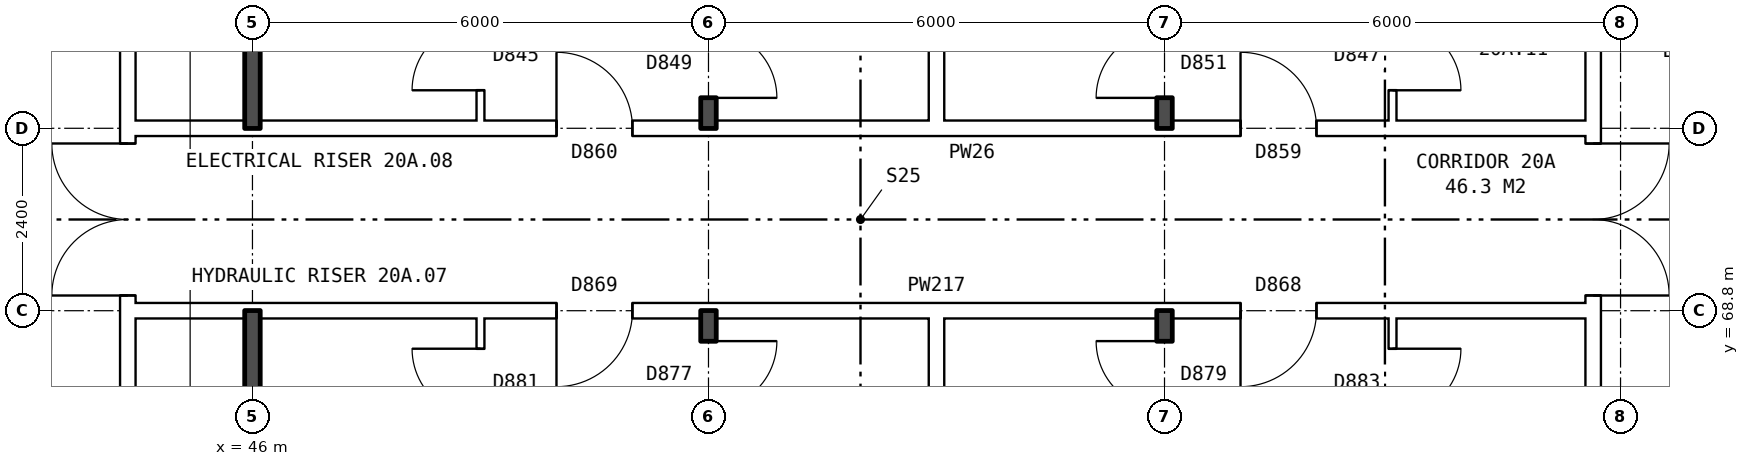
"""IFC4 building model, lengths in metres.
Left out: names, types, materials, properties, quantities, classifications, styles, units other than length and angle.
Written with IfcOpenShell. Run it as: python <this file> out.ifc"""

import sys

from ifc_helpers import new_model, si_unit, direction, frame, frame_2d, origin, place, context, subcontext, project, spatial, rectangle, extrude, element, fill, save


model = new_model("IFC4")
c1 = context("Model", 3, precision=1e-05, world=origin(), true_north=direction((0.0, 1.0)))
c2 = subcontext(c1, "Body", "Model", "MODEL_VIEW")
j1 = project(units=[si_unit("LENGTHUNIT", "METRE"), si_unit("PLANEANGLEUNIT", "RADIAN")], contexts=[c1])
p1 = place(None, origin())
s1 = spatial("IfcSite", under=j1, at=p1, CompositionType="ELEMENT")
p2 = place(p1, origin())
s2 = spatial("IfcBuilding", under=s1, at=p2, CompositionType="ELEMENT")
p3 = place(p2, frame((0.0, 0.0, 74.7)))
s3 = spatial("IfcBuildingStorey", under=s2, at=p3, CompositionType="ELEMENT", Elevation=74.7)
p4 = place(p3, frame((63.64, 63.9, 0.0), z_axis=(0.0, 0.0, 1.0), x_axis=(0.0, 1.0, 0.0)))
e1 = element("IfcWall", 1, at=p4, inside=s3, PredefinedType="PARTITIONING", context=c2, shape_type="SweptSolid", body=[
    extrude(rectangle(XDim=12.2, YDim=0.2, at=frame_2d((6.1, 0.0))), origin(), (0.0, 0.0, 1.0), 2.85),
])
p5 = place(p4, frame((5.1, 0.0, 0.0)))
e2 = element("IfcOpeningElement", 2, at=p5, cuts=e1, PredefinedType="OPENING", context=c2, shape_type="SweptSolid", body=[
    extrude(rectangle(XDim=2.0, YDim=2.1, at=frame_2d((1.0, 1.05))), frame((0.0, 0.11, 0.0), z_axis=(0.0, -1.0, 0.0), x_axis=(1.0, 0.0, 0.0)), (0.0, 0.0, 1.0), 0.22),
])
p6 = place(p3, frame((44.36, 63.9, 0.0), z_axis=(0.0, 0.0, 1.0), x_axis=(0.0, 1.0, 0.0)))
e3 = element("IfcWall", 3, at=p6, inside=s3, PredefinedType="PARTITIONING", context=c2, shape_type="SweptSolid", body=[
    extrude(rectangle(XDim=12.2, YDim=0.2, at=frame_2d((6.1, 0.0))), origin(), (0.0, 0.0, 1.0), 2.85),
])
p7 = place(p6, frame((5.1, 0.0, 0.0)))
e4 = element("IfcOpeningElement", 4, at=p7, cuts=e3, PredefinedType="OPENING", context=c2, shape_type="SweptSolid", body=[
    extrude(rectangle(XDim=2.0, YDim=2.1, at=frame_2d((1.0, 1.05))), frame((0.0, 0.11, 0.0), z_axis=(0.0, -1.0, 0.0), x_axis=(1.0, 0.0, 0.0)), (0.0, 0.0, 1.0), 0.22),
])
p8 = place(p3, frame((44.36, 68.8, 0.0), z_axis=(0.0, 0.0, 1.0), x_axis=(1.0, 0.0, 0.0)))
e5 = element("IfcWall", 5, at=p8, inside=s3, PredefinedType="PARTITIONING", context=c2, shape_type="SweptSolid", body=[
    extrude(rectangle(XDim=19.28, YDim=0.2, at=frame_2d((9.64, 0.0))), origin(), (0.0, 0.0, 1.0), 2.85),
])
p9 = place(p8, frame((14.64, 0.0, 0.0)))
e6 = element("IfcOpeningElement", 6, at=p9, cuts=e5, PredefinedType="OPENING", context=c2, shape_type="SweptSolid", body=[
    extrude(rectangle(XDim=1.0, YDim=2.1, at=frame_2d((0.5, 1.05))), frame((0.0, 0.11, 0.0), z_axis=(0.0, -1.0, 0.0), x_axis=(1.0, 0.0, 0.0)), (0.0, 0.0, 1.0), 0.22),
])
p10 = place(p8, frame((5.64, 0.0, 0.0)))
e7 = element("IfcOpeningElement", 7, at=p10, cuts=e5, PredefinedType="OPENING", context=c2, shape_type="SweptSolid", body=[
    extrude(rectangle(XDim=1.0, YDim=2.1, at=frame_2d((0.5, 1.05))), frame((0.0, 0.11, 0.0), z_axis=(0.0, -1.0, 0.0), x_axis=(1.0, 0.0, 0.0)), (0.0, 0.0, 1.0), 0.22),
])
p11 = place(p3, frame((44.36, 71.2, 0.0), z_axis=(0.0, 0.0, 1.0), x_axis=(1.0, 0.0, 0.0)))
e8 = element("IfcWall", 8, at=p11, inside=s3, PredefinedType="PARTITIONING", context=c2, shape_type="SweptSolid", body=[
    extrude(rectangle(XDim=19.28, YDim=0.2, at=frame_2d((9.64, 0.0))), origin(), (0.0, 0.0, 1.0), 2.85),
])
p12 = place(p11, frame((14.64, 0.0, 0.0)))
e9 = element("IfcOpeningElement", 9, at=p12, cuts=e8, PredefinedType="OPENING", context=c2, shape_type="SweptSolid", body=[
    extrude(rectangle(XDim=1.0, YDim=2.1, at=frame_2d((0.5, 1.05))), frame((0.0, 0.11, 0.0), z_axis=(0.0, -1.0, 0.0), x_axis=(1.0, 0.0, 0.0)), (0.0, 0.0, 1.0), 0.22),
])
p13 = place(p11, frame((5.64, 0.0, 0.0)))
e10 = element("IfcOpeningElement", 10, at=p13, cuts=e8, PredefinedType="OPENING", context=c2, shape_type="SweptSolid", body=[
    extrude(rectangle(XDim=1.0, YDim=2.1, at=frame_2d((0.5, 1.05))), frame((0.0, 0.11, 0.0), z_axis=(0.0, -1.0, 0.0), x_axis=(1.0, 0.0, 0.0)), (0.0, 0.0, 1.0), 0.22),
])
for number, where, z_axis, x_axis in (
    (11, (46.0, 63.8, 0.0), (0.0, 0.0, 1.0), (0.0, 1.0, 0.0)),
    (12, (46.0, 71.2, 0.0), (0.0, 0.0, 1.0), (0.0, 1.0, 0.0)),
):
    element("IfcWall", number, at=place(p3, frame(where, z_axis=z_axis, x_axis=x_axis)), inside=s3, PredefinedType="SOLIDWALL", context=c2, shape_type="SweptSolid", body=[
        extrude(rectangle(XDim=5.0, YDim=0.2, at=frame_2d((2.5, 0.0))), origin(), (0.0, 0.0, 1.0), 2.85),
    ])
p14 = place(p3, frame((49.0, 54.36, 0.0), z_axis=(0.0, 0.0, 1.0), x_axis=(0.0, 1.0, 0.0)))
e13 = element("IfcWall", 13, at=p14, inside=s3, PredefinedType="PARTITIONING", context=c2, shape_type="SweptSolid", body=[
    extrude(rectangle(XDim=14.34, YDim=0.1, at=frame_2d((7.17, 0.0))), origin(), (0.0, 0.0, 1.0), 2.85),
])
p15 = place(p14, frame((6.7, 0.0, 0.0)))
e14 = element("IfcOpeningElement", 14, at=p15, cuts=e13, PredefinedType="OPENING", context=c2, shape_type="SweptSolid", body=[
    extrude(rectangle(XDim=0.9, YDim=2.1, at=frame_2d((0.45, 1.05))), frame((0.0, 0.06, 0.0), z_axis=(0.0, -1.0, 0.0), x_axis=(1.0, 0.0, 0.0)), (0.0, 0.0, 1.0), 0.12),
])
p16 = place(p14, frame((13.04, 0.0, 0.0)))
e15 = element("IfcOpeningElement", 15, at=p16, cuts=e13, PredefinedType="OPENING", context=c2, shape_type="SweptSolid", body=[
    extrude(rectangle(XDim=0.9, YDim=2.1, at=frame_2d((0.45, 1.05))), frame((0.0, 0.06, 0.0), z_axis=(0.0, -1.0, 0.0), x_axis=(1.0, 0.0, 0.0)), (0.0, 0.0, 1.0), 0.12),
])
p17 = place(p3, frame((49.0, 71.3, 0.0), z_axis=(0.0, 0.0, 1.0), x_axis=(0.0, 1.0, 0.0)))
e16 = element("IfcWall", 16, at=p17, inside=s3, PredefinedType="PARTITIONING", context=c2, shape_type="SweptSolid", body=[
    extrude(rectangle(XDim=14.34, YDim=0.1, at=frame_2d((7.17, 0.0))), origin(), (0.0, 0.0, 1.0), 2.85),
])
p18 = place(p17, frame((5.74, 0.0, 0.0)))
e17 = element("IfcOpeningElement", 17, at=p18, cuts=e16, PredefinedType="OPENING", context=c2, shape_type="SweptSolid", body=[
    extrude(rectangle(XDim=0.9, YDim=2.1, at=frame_2d((0.45, 1.05))), frame((0.0, 0.06, 0.0), z_axis=(0.0, -1.0, 0.0), x_axis=(1.0, 0.0, 0.0)), (0.0, 0.0, 1.0), 0.12),
])
p19 = place(p17, frame((0.4, 0.0, 0.0)))
e18 = element("IfcOpeningElement", 18, at=p19, cuts=e16, PredefinedType="OPENING", context=c2, shape_type="SweptSolid", body=[
    extrude(rectangle(XDim=0.9, YDim=2.1, at=frame_2d((0.45, 1.05))), frame((0.0, 0.06, 0.0), z_axis=(0.0, -1.0, 0.0), x_axis=(1.0, 0.0, 0.0)), (0.0, 0.0, 1.0), 0.12),
])
p20 = place(p3, frame((52.0, 54.36, 0.0), z_axis=(0.0, 0.0, 1.0), x_axis=(0.0, 1.0, 0.0)))
e19 = element("IfcWall", 19, at=p20, inside=s3, PredefinedType="SOLIDWALL", context=c2, shape_type="SweptSolid", body=[
    extrude(rectangle(XDim=14.44, YDim=0.2, at=frame_2d((7.22, 0.0))), origin(), (0.0, 0.0, 1.0), 2.85),
])
p21 = place(p20, frame((6.7, 0.0, 0.0)))
e20 = element("IfcOpeningElement", 20, at=p21, cuts=e19, PredefinedType="OPENING", context=c2, shape_type="SweptSolid", body=[
    extrude(rectangle(XDim=0.9, YDim=2.1, at=frame_2d((0.45, 1.05))), frame((0.0, 0.11, 0.0), z_axis=(0.0, -1.0, 0.0), x_axis=(1.0, 0.0, 0.0)), (0.0, 0.0, 1.0), 0.22),
])
p22 = place(p20, frame((13.14, 0.0, 0.0)))
e21 = element("IfcOpeningElement", 21, at=p22, cuts=e19, PredefinedType="OPENING", context=c2, shape_type="SweptSolid", body=[
    extrude(rectangle(XDim=0.9, YDim=2.1, at=frame_2d((0.45, 1.05))), frame((0.0, 0.11, 0.0), z_axis=(0.0, -1.0, 0.0), x_axis=(1.0, 0.0, 0.0)), (0.0, 0.0, 1.0), 0.22),
])
p23 = place(p3, frame((52.0, 71.2, 0.0), z_axis=(0.0, 0.0, 1.0), x_axis=(0.0, 1.0, 0.0)))
e22 = element("IfcWall", 22, at=p23, inside=s3, PredefinedType="SOLIDWALL", context=c2, shape_type="SweptSolid", body=[
    extrude(rectangle(XDim=14.44, YDim=0.2, at=frame_2d((7.22, 0.0))), origin(), (0.0, 0.0, 1.0), 2.85),
])
p24 = place(p23, frame((5.84, 0.0, 0.0)))
e23 = element("IfcOpeningElement", 23, at=p24, cuts=e22, PredefinedType="OPENING", context=c2, shape_type="SweptSolid", body=[
    extrude(rectangle(XDim=0.9, YDim=2.1, at=frame_2d((0.45, 1.05))), frame((0.0, 0.11, 0.0), z_axis=(0.0, -1.0, 0.0), x_axis=(1.0, 0.0, 0.0)), (0.0, 0.0, 1.0), 0.22),
])
p25 = place(p23, frame((0.4, 0.0, 0.0)))
e24 = element("IfcOpeningElement", 24, at=p25, cuts=e22, PredefinedType="OPENING", context=c2, shape_type="SweptSolid", body=[
    extrude(rectangle(XDim=0.9, YDim=2.1, at=frame_2d((0.45, 1.05))), frame((0.0, 0.11, 0.0), z_axis=(0.0, -1.0, 0.0), x_axis=(1.0, 0.0, 0.0)), (0.0, 0.0, 1.0), 0.22),
])
for number, where, z_axis, x_axis in (
    (25, (55.0, 54.36, 0.0), (0.0, 0.0, 1.0), (0.0, 1.0, 0.0)),
    (26, (55.0, 71.3, 0.0), (0.0, 0.0, 1.0), (0.0, 1.0, 0.0)),
):
    element("IfcWall", number, at=place(p3, frame(where, z_axis=z_axis, x_axis=x_axis)), inside=s3, PredefinedType="PARTITIONING", context=c2, shape_type="SweptSolid", body=[
        extrude(rectangle(XDim=14.34, YDim=0.2, at=frame_2d((7.17, 0.0))), origin(), (0.0, 0.0, 1.0), 2.85),
    ])
p26 = place(p3, frame((58.0, 54.36, 0.0), z_axis=(0.0, 0.0, 1.0), x_axis=(0.0, 1.0, 0.0)))
e27 = element("IfcWall", 27, at=p26, inside=s3, PredefinedType="SOLIDWALL", context=c2, shape_type="SweptSolid", body=[
    extrude(rectangle(XDim=14.44, YDim=0.2, at=frame_2d((7.22, 0.0))), origin(), (0.0, 0.0, 1.0), 2.85),
])
p27 = place(p26, frame((7.7, 0.0, 0.0)))
e28 = element("IfcOpeningElement", 28, at=p27, cuts=e27, PredefinedType="OPENING", context=c2, shape_type="SweptSolid", body=[
    extrude(rectangle(XDim=0.9, YDim=2.1, at=frame_2d((0.45, 1.05))), frame((0.0, 0.11, 0.0), z_axis=(0.0, -1.0, 0.0), x_axis=(1.0, 0.0, 0.0)), (0.0, 0.0, 1.0), 0.22),
])
p28 = place(p26, frame((13.14, 0.0, 0.0)))
e29 = element("IfcOpeningElement", 29, at=p28, cuts=e27, PredefinedType="OPENING", context=c2, shape_type="SweptSolid", body=[
    extrude(rectangle(XDim=0.9, YDim=2.1, at=frame_2d((0.45, 1.05))), frame((0.0, 0.11, 0.0), z_axis=(0.0, -1.0, 0.0), x_axis=(1.0, 0.0, 0.0)), (0.0, 0.0, 1.0), 0.22),
])
p29 = place(p3, frame((58.0, 71.2, 0.0), z_axis=(0.0, 0.0, 1.0), x_axis=(0.0, 1.0, 0.0)))
e30 = element("IfcWall", 30, at=p29, inside=s3, PredefinedType="SOLIDWALL", context=c2, shape_type="SweptSolid", body=[
    extrude(rectangle(XDim=14.44, YDim=0.2, at=frame_2d((7.22, 0.0))), origin(), (0.0, 0.0, 1.0), 2.85),
])
p30 = place(p29, frame((8.04, 0.0, 0.0)))
e31 = element("IfcOpeningElement", 31, at=p30, cuts=e30, PredefinedType="OPENING", context=c2, shape_type="SweptSolid", body=[
    extrude(rectangle(XDim=0.9, YDim=2.1, at=frame_2d((0.45, 1.05))), frame((0.0, 0.11, 0.0), z_axis=(0.0, -1.0, 0.0), x_axis=(1.0, 0.0, 0.0)), (0.0, 0.0, 1.0), 0.22),
])
p31 = place(p29, frame((0.4, 0.0, 0.0)))
e32 = element("IfcOpeningElement", 32, at=p31, cuts=e30, PredefinedType="OPENING", context=c2, shape_type="SweptSolid", body=[
    extrude(rectangle(XDim=0.9, YDim=2.1, at=frame_2d((0.45, 1.05))), frame((0.0, 0.11, 0.0), z_axis=(0.0, -1.0, 0.0), x_axis=(1.0, 0.0, 0.0)), (0.0, 0.0, 1.0), 0.22),
])
p32 = place(p3, frame((61.0, 54.36, 0.0), z_axis=(0.0, 0.0, 1.0), x_axis=(0.0, 1.0, 0.0)))
e33 = element("IfcWall", 33, at=p32, inside=s3, PredefinedType="PARTITIONING", context=c2, shape_type="SweptSolid", body=[
    extrude(rectangle(XDim=14.34, YDim=0.1, at=frame_2d((7.17, 0.0))), origin(), (0.0, 0.0, 1.0), 2.85),
])
p33 = place(p32, frame((7.7, 0.0, 0.0)))
e34 = element("IfcOpeningElement", 34, at=p33, cuts=e33, PredefinedType="OPENING", context=c2, shape_type="SweptSolid", body=[
    extrude(rectangle(XDim=0.9, YDim=2.1, at=frame_2d((0.45, 1.05))), frame((0.0, 0.06, 0.0), z_axis=(0.0, -1.0, 0.0), x_axis=(1.0, 0.0, 0.0)), (0.0, 0.0, 1.0), 0.12),
])
p34 = place(p32, frame((13.04, 0.0, 0.0)))
e35 = element("IfcOpeningElement", 35, at=p34, cuts=e33, PredefinedType="OPENING", context=c2, shape_type="SweptSolid", body=[
    extrude(rectangle(XDim=0.9, YDim=2.1, at=frame_2d((0.45, 1.05))), frame((0.0, 0.06, 0.0), z_axis=(0.0, -1.0, 0.0), x_axis=(1.0, 0.0, 0.0)), (0.0, 0.0, 1.0), 0.12),
])
p35 = place(p3, frame((61.0, 71.3, 0.0), z_axis=(0.0, 0.0, 1.0), x_axis=(0.0, 1.0, 0.0)))
e36 = element("IfcWall", 36, at=p35, inside=s3, PredefinedType="PARTITIONING", context=c2, shape_type="SweptSolid", body=[
    extrude(rectangle(XDim=14.34, YDim=0.1, at=frame_2d((7.17, 0.0))), origin(), (0.0, 0.0, 1.0), 2.85),
])
p36 = place(p35, frame((7.94, 0.0, 0.0)))
e37 = element("IfcOpeningElement", 37, at=p36, cuts=e36, PredefinedType="OPENING", context=c2, shape_type="SweptSolid", body=[
    extrude(rectangle(XDim=0.9, YDim=2.1, at=frame_2d((0.45, 1.05))), frame((0.0, 0.06, 0.0), z_axis=(0.0, -1.0, 0.0), x_axis=(1.0, 0.0, 0.0)), (0.0, 0.0, 1.0), 0.12),
])
p37 = place(p35, frame((0.4, 0.0, 0.0)))
e38 = element("IfcOpeningElement", 38, at=p37, cuts=e36, PredefinedType="OPENING", context=c2, shape_type="SweptSolid", body=[
    extrude(rectangle(XDim=0.9, YDim=2.1, at=frame_2d((0.45, 1.05))), frame((0.0, 0.06, 0.0), z_axis=(0.0, -1.0, 0.0), x_axis=(1.0, 0.0, 0.0)), (0.0, 0.0, 1.0), 0.12),
])
p38 = place(p5, frame((2.0, 0.0, 0.0), z_axis=(0.0, 0.0, 1.0), x_axis=(-1.0, 0.0, 0.0)))
e39 = element("IfcDoor", 39, at=p38, inside=s3, OperationType="DOUBLE_DOOR_SINGLE_SWING", PredefinedType="DOOR", context=c2, shape_type="SweptSolid", body=[
    extrude(rectangle(XDim=2.0, YDim=2.1, at=frame_2d((1.0, 1.05))), frame((0.0, 0.025, 0.0), z_axis=(0.0, -1.0, 0.0), x_axis=(1.0, 0.0, 0.0)), (0.0, 0.0, 1.0), 0.05),
])
fill(e2, e39)
p39 = place(p7, origin())
e40 = element("IfcDoor", 40, at=p39, inside=s3, OperationType="DOUBLE_DOOR_SINGLE_SWING", PredefinedType="DOOR", context=c2, shape_type="SweptSolid", body=[
    extrude(rectangle(XDim=2.0, YDim=2.1, at=frame_2d((1.0, 1.05))), frame((0.0, 0.025, 0.0), z_axis=(0.0, -1.0, 0.0), x_axis=(1.0, 0.0, 0.0)), (0.0, 0.0, 1.0), 0.05),
])
fill(e4, e40)
p40 = place(p9, frame((1.0, 0.0, 0.0), z_axis=(0.0, 0.0, 1.0), x_axis=(-1.0, 0.0, 0.0)))
e41 = element("IfcDoor", 41, at=p40, inside=s3, OperationType="SINGLE_SWING_RIGHT", PredefinedType="DOOR", context=c2, shape_type="SweptSolid", body=[
    extrude(rectangle(XDim=1.0, YDim=2.1, at=frame_2d((0.5, 1.05))), frame((0.0, 0.025, 0.0), z_axis=(0.0, -1.0, 0.0), x_axis=(1.0, 0.0, 0.0)), (0.0, 0.0, 1.0), 0.05),
])
fill(e6, e41)
p41 = place(p34, frame((0.9, 0.0, 0.0), z_axis=(0.0, 0.0, 1.0), x_axis=(-1.0, 0.0, 0.0)))
e42 = element("IfcDoor", 42, at=p41, inside=s3, OperationType="SINGLE_SWING_LEFT", PredefinedType="DOOR", context=c2, shape_type="SweptSolid", body=[
    extrude(rectangle(XDim=0.9, YDim=2.1, at=frame_2d((0.45, 1.05))), frame((0.0, 0.025, 0.0), z_axis=(0.0, -1.0, 0.0), x_axis=(1.0, 0.0, 0.0)), (0.0, 0.0, 1.0), 0.05),
])
fill(e35, e42)
p42 = place(p28, origin())
e43 = element("IfcDoor", 43, at=p42, inside=s3, OperationType="SINGLE_SWING_RIGHT", PredefinedType="DOOR", context=c2, shape_type="SweptSolid", body=[
    extrude(rectangle(XDim=0.9, YDim=2.1, at=frame_2d((0.45, 1.05))), frame((0.0, 0.025, 0.0), z_axis=(0.0, -1.0, 0.0), x_axis=(1.0, 0.0, 0.0)), (0.0, 0.0, 1.0), 0.05),
])
fill(e29, e43)
p43 = place(p10, frame((1.0, 0.0, 0.0), z_axis=(0.0, 0.0, 1.0), x_axis=(-1.0, 0.0, 0.0)))
e44 = element("IfcDoor", 44, at=p43, inside=s3, OperationType="SINGLE_SWING_RIGHT", PredefinedType="DOOR", context=c2, shape_type="SweptSolid", body=[
    extrude(rectangle(XDim=1.0, YDim=2.1, at=frame_2d((0.5, 1.05))), frame((0.0, 0.025, 0.0), z_axis=(0.0, -1.0, 0.0), x_axis=(1.0, 0.0, 0.0)), (0.0, 0.0, 1.0), 0.05),
])
fill(e7, e44)
p44 = place(p22, frame((0.9, 0.0, 0.0), z_axis=(0.0, 0.0, 1.0), x_axis=(-1.0, 0.0, 0.0)))
e45 = element("IfcDoor", 45, at=p44, inside=s3, OperationType="SINGLE_SWING_LEFT", PredefinedType="DOOR", context=c2, shape_type="SweptSolid", body=[
    extrude(rectangle(XDim=0.9, YDim=2.1, at=frame_2d((0.45, 1.05))), frame((0.0, 0.025, 0.0), z_axis=(0.0, -1.0, 0.0), x_axis=(1.0, 0.0, 0.0)), (0.0, 0.0, 1.0), 0.05),
])
fill(e21, e45)
p45 = place(p16, origin())
e46 = element("IfcDoor", 46, at=p45, inside=s3, OperationType="SINGLE_SWING_RIGHT", PredefinedType="DOOR", context=c2, shape_type="SweptSolid", body=[
    extrude(rectangle(XDim=0.9, YDim=2.1, at=frame_2d((0.45, 1.05))), frame((0.0, 0.025, 0.0), z_axis=(0.0, -1.0, 0.0), x_axis=(1.0, 0.0, 0.0)), (0.0, 0.0, 1.0), 0.05),
])
fill(e15, e46)
p46 = place(p12, origin())
e47 = element("IfcDoor", 47, at=p46, inside=s3, OperationType="SINGLE_SWING_LEFT", PredefinedType="DOOR", context=c2, shape_type="SweptSolid", body=[
    extrude(rectangle(XDim=1.0, YDim=2.1, at=frame_2d((0.5, 1.05))), frame((0.0, 0.025, 0.0), z_axis=(0.0, -1.0, 0.0), x_axis=(1.0, 0.0, 0.0)), (0.0, 0.0, 1.0), 0.05),
])
fill(e9, e47)
p47 = place(p37, frame((0.9, 0.0, 0.0), z_axis=(0.0, 0.0, 1.0), x_axis=(-1.0, 0.0, 0.0)))
e48 = element("IfcDoor", 48, at=p47, inside=s3, OperationType="SINGLE_SWING_RIGHT", PredefinedType="DOOR", context=c2, shape_type="SweptSolid", body=[
    extrude(rectangle(XDim=0.9, YDim=2.1, at=frame_2d((0.45, 1.05))), frame((0.0, 0.025, 0.0), z_axis=(0.0, -1.0, 0.0), x_axis=(1.0, 0.0, 0.0)), (0.0, 0.0, 1.0), 0.05),
])
fill(e38, e48)
p48 = place(p31, origin())
e49 = element("IfcDoor", 49, at=p48, inside=s3, OperationType="SINGLE_SWING_LEFT", PredefinedType="DOOR", context=c2, shape_type="SweptSolid", body=[
    extrude(rectangle(XDim=0.9, YDim=2.1, at=frame_2d((0.45, 1.05))), frame((0.0, 0.025, 0.0), z_axis=(0.0, -1.0, 0.0), x_axis=(1.0, 0.0, 0.0)), (0.0, 0.0, 1.0), 0.05),
])
fill(e32, e49)
p49 = place(p13, origin())
e50 = element("IfcDoor", 50, at=p49, inside=s3, OperationType="SINGLE_SWING_LEFT", PredefinedType="DOOR", context=c2, shape_type="SweptSolid", body=[
    extrude(rectangle(XDim=1.0, YDim=2.1, at=frame_2d((0.5, 1.05))), frame((0.0, 0.025, 0.0), z_axis=(0.0, -1.0, 0.0), x_axis=(1.0, 0.0, 0.0)), (0.0, 0.0, 1.0), 0.05),
])
fill(e10, e50)
p50 = place(p25, frame((0.9, 0.0, 0.0), z_axis=(0.0, 0.0, 1.0), x_axis=(-1.0, 0.0, 0.0)))
e51 = element("IfcDoor", 51, at=p50, inside=s3, OperationType="SINGLE_SWING_RIGHT", PredefinedType="DOOR", context=c2, shape_type="SweptSolid", body=[
    extrude(rectangle(XDim=0.9, YDim=2.1, at=frame_2d((0.45, 1.05))), frame((0.0, 0.025, 0.0), z_axis=(0.0, -1.0, 0.0), x_axis=(1.0, 0.0, 0.0)), (0.0, 0.0, 1.0), 0.05),
])
fill(e24, e51)
p51 = place(p19, origin())
e52 = element("IfcDoor", 52, at=p51, inside=s3, OperationType="SINGLE_SWING_LEFT", PredefinedType="DOOR", context=c2, shape_type="SweptSolid", body=[
    extrude(rectangle(XDim=0.9, YDim=2.1, at=frame_2d((0.45, 1.05))), frame((0.0, 0.025, 0.0), z_axis=(0.0, -1.0, 0.0), x_axis=(1.0, 0.0, 0.0)), (0.0, 0.0, 1.0), 0.05),
])
fill(e18, e52)
save(model, sys.argv[1])
